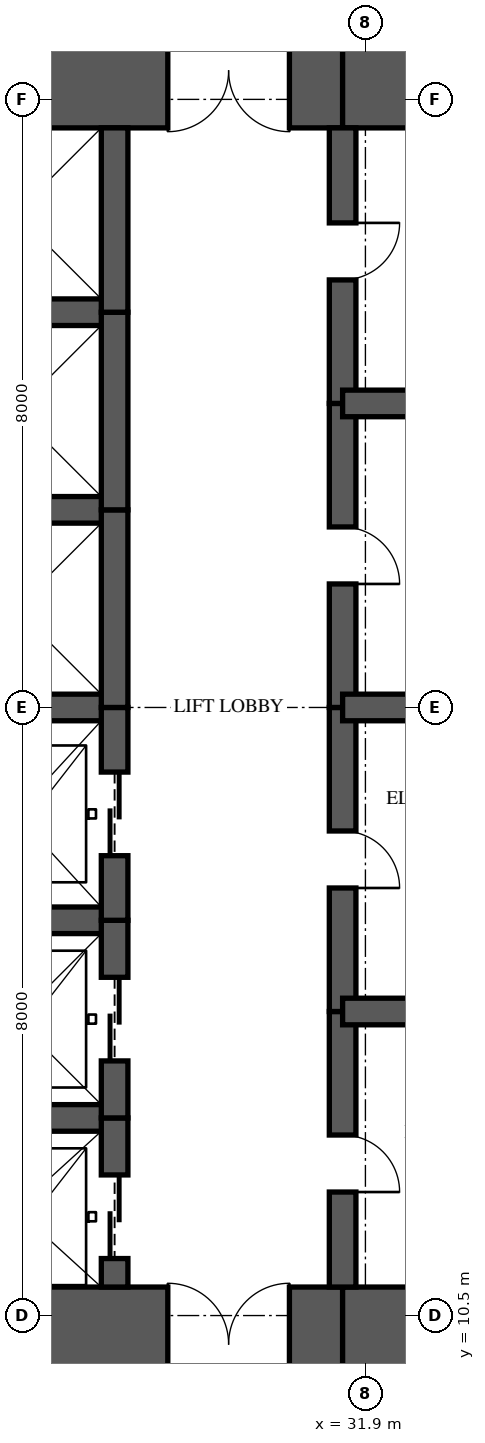
"""IFC4 building model, lengths in metres.
Left out: names, types, materials, properties, quantities, classifications, styles, units other than length and angle.
Written with IfcOpenShell. Run it as: python <this file> out.ifc"""

import sys

from ifc_helpers import new_model, si_unit, direction, frame, frame_2d, origin, place, context, subcontext, project, spatial, rectangle, extrude, element, fill, save


model = new_model("IFC4")
c1 = context("Model", 3, precision=1e-05, world=origin(), true_north=direction((0.0, 1.0)))
c2 = subcontext(c1, "Body", "Model", "MODEL_VIEW")
j1 = project(units=[si_unit("LENGTHUNIT", "METRE"), si_unit("PLANEANGLEUNIT", "RADIAN")], contexts=[c1])
p1 = place(None, origin())
s1 = spatial("IfcSite", under=j1, at=p1, CompositionType="ELEMENT")
p2 = place(p1, origin())
s2 = spatial("IfcBuilding", under=s1, at=p2, CompositionType="ELEMENT")
p3 = place(p2, frame((0.0, 0.0, 135.0)))
s3 = spatial("IfcBuildingStorey", under=s2, at=p3, CompositionType="ELEMENT", Elevation=135.0)
p4 = place(p3, frame((26.0, 10.125, 0.0), z_axis=(0.0, 0.0, 1.0), x_axis=(1.0, 0.0, 0.0)))
e1 = element("IfcWall", 1, at=p4, inside=s3, PredefinedType="SHEAR", context=c2, shape_type="SweptSolid", body=[
    extrude(rectangle(XDim=5.6, YDim=1.5, at=frame_2d((2.8, 0.0))), origin(), (0.0, 0.0, 1.0), 3.35),
])
p5 = place(p4, frame((3.3, 0.0, 0.0)))
e2 = element("IfcOpeningElement", 2, at=p5, cuts=e1, PredefinedType="OPENING", context=c2, shape_type="SweptSolid", body=[
    extrude(rectangle(XDim=1.6, YDim=2.1, at=frame_2d((0.8, 1.05))), frame((0.0, 0.76, 0.0), z_axis=(0.0, -1.0, 0.0), x_axis=(1.0, 0.0, 0.0)), (0.0, 0.0, 1.0), 1.52),
])
for number, where, z_axis, x_axis in (
    (3, (31.6, 10.125, 0.0), (0.0, 0.0, 1.0), (1.0, 0.0, 0.0)),
    (4, (35.9, 26.875, 0.0), (0.0, 0.0, 1.0), (-1.0, 0.0, 0.0)),
):
    element("IfcWall", number, at=place(p3, frame(where, z_axis=z_axis, x_axis=x_axis)), inside=s3, PredefinedType="SHEAR", context=c2, shape_type="SweptSolid", body=[
        extrude(rectangle(XDim=4.3, YDim=1.5, at=frame_2d((2.15, 0.0))), origin(), (0.0, 0.0, 1.0), 3.35),
    ])
p6 = place(p3, frame((31.6, 26.875, 0.0), z_axis=(0.0, 0.0, 1.0), x_axis=(-1.0, 0.0, 0.0)))
e5 = element("IfcWall", 5, at=p6, inside=s3, PredefinedType="SHEAR", context=c2, shape_type="SweptSolid", body=[
    extrude(rectangle(XDim=5.6, YDim=1.5, at=frame_2d((2.8, 0.0))), origin(), (0.0, 0.0, 1.0), 3.35),
])
p7 = place(p6, frame((0.7, 0.0, 0.0)))
e6 = element("IfcOpeningElement", 6, at=p7, cuts=e5, PredefinedType="OPENING", context=c2, shape_type="SweptSolid", body=[
    extrude(rectangle(XDim=1.6, YDim=2.1, at=frame_2d((0.8, 1.05))), frame((0.0, 0.76, 0.0), z_axis=(0.0, -1.0, 0.0), x_axis=(1.0, 0.0, 0.0)), (0.0, 0.0, 1.0), 1.52),
])
p8 = place(p3, frame((28.6, 10.875, 0.0), z_axis=(0.0, 0.0, 1.0), x_axis=(0.0, 1.0, 0.0)))
e7 = element("IfcWall", 7, at=p8, inside=s3, PredefinedType="SHEAR", context=c2, shape_type="SweptSolid", body=[
    extrude(rectangle(XDim=2.225, YDim=0.35, at=frame_2d((1.113, 0.0))), origin(), (0.0, 0.0, 1.0), 3.35),
])
p9 = place(p8, frame((0.375, 0.0, 0.0)))
e8 = element("IfcOpeningElement", 8, at=p9, cuts=e7, PredefinedType="OPENING", context=c2, shape_type="SweptSolid", body=[
    extrude(rectangle(XDim=1.1, YDim=2.1, at=frame_2d((0.55, 1.05))), frame((0.0, 0.185, 0.0), z_axis=(0.0, -1.0, 0.0), x_axis=(1.0, 0.0, 0.0)), (0.0, 0.0, 1.0), 0.37),
])
p10 = place(p3, frame((28.6, 13.1, 0.0), z_axis=(0.0, 0.0, 1.0), x_axis=(0.0, 1.0, 0.0)))
e9 = element("IfcWall", 9, at=p10, inside=s3, PredefinedType="SHEAR", context=c2, shape_type="SweptSolid", body=[
    extrude(rectangle(XDim=2.6, YDim=0.35, at=frame_2d((1.3, 0.0))), origin(), (0.0, 0.0, 1.0), 3.35),
])
p11 = place(p10, frame((0.75, 0.0, 0.0)))
e10 = element("IfcOpeningElement", 10, at=p11, cuts=e9, PredefinedType="OPENING", context=c2, shape_type="SweptSolid", body=[
    extrude(rectangle(XDim=1.1, YDim=2.1, at=frame_2d((0.55, 1.05))), frame((0.0, 0.185, 0.0), z_axis=(0.0, -1.0, 0.0), x_axis=(1.0, 0.0, 0.0)), (0.0, 0.0, 1.0), 0.37),
])
p12 = place(p3, frame((28.6, 15.7, 0.0), z_axis=(0.0, 0.0, 1.0), x_axis=(0.0, 1.0, 0.0)))
e11 = element("IfcWall", 11, at=p12, inside=s3, PredefinedType="SHEAR", context=c2, shape_type="SweptSolid", body=[
    extrude(rectangle(XDim=2.8, YDim=0.35, at=frame_2d((1.4, 0.0))), origin(), (0.0, 0.0, 1.0), 3.35),
])
p13 = place(p12, frame((0.85, 0.0, 0.0)))
e12 = element("IfcOpeningElement", 12, at=p13, cuts=e11, PredefinedType="OPENING", context=c2, shape_type="SweptSolid", body=[
    extrude(rectangle(XDim=1.1, YDim=2.1, at=frame_2d((0.55, 1.05))), frame((0.0, 0.185, 0.0), z_axis=(0.0, -1.0, 0.0), x_axis=(1.0, 0.0, 0.0)), (0.0, 0.0, 1.0), 0.37),
])
p14 = place(p3, frame((28.6, 18.5, 0.0), z_axis=(0.0, 0.0, 1.0), x_axis=(0.0, 1.0, 0.0)))
e13 = element("IfcWall", 13, at=p14, inside=s3, PredefinedType="SHEAR", context=c2, shape_type="SweptSolid", body=[
    extrude(rectangle(XDim=2.6, YDim=0.35, at=frame_2d((1.3, 0.0))), origin(), (0.0, 0.0, 1.0), 3.35),
])
p15 = place(p3, frame((28.6, 21.1, 0.0), z_axis=(0.0, 0.0, 1.0), x_axis=(0.0, 1.0, 0.0)))
e14 = element("IfcWall", 14, at=p15, inside=s3, PredefinedType="SHEAR", context=c2, shape_type="SweptSolid", body=[
    extrude(rectangle(XDim=2.6, YDim=0.35, at=frame_2d((1.3, 0.0))), origin(), (0.0, 0.0, 1.0), 3.35),
])
p16 = place(p3, frame((28.6, 23.7, 0.0), z_axis=(0.0, 0.0, 1.0), x_axis=(0.0, 1.0, 0.0)))
e15 = element("IfcWall", 15, at=p16, inside=s3, PredefinedType="SHEAR", context=c2, shape_type="SweptSolid", body=[
    extrude(rectangle(XDim=2.425, YDim=0.35, at=frame_2d((1.212, 0.0))), origin(), (0.0, 0.0, 1.0), 3.35),
])
p17 = place(p3, frame((31.6, 10.875, 0.0), z_axis=(0.0, 0.0, 1.0), x_axis=(0.0, 1.0, 0.0)))
e16 = element("IfcWall", 16, at=p17, inside=s3, PredefinedType="SHEAR", context=c2, shape_type="SweptSolid", body=[
    extrude(rectangle(XDim=3.625, YDim=0.35, at=frame_2d((1.812, 0.0))), origin(), (0.0, 0.0, 1.0), 3.35),
])
p18 = place(p17, frame((1.25, 0.0, 0.0)))
e17 = element("IfcOpeningElement", 17, at=p18, cuts=e16, PredefinedType="OPENING", context=c2, shape_type="SweptSolid", body=[
    extrude(rectangle(XDim=0.75, YDim=2.1, at=frame_2d((0.375, 1.05))), frame((0.0, 0.185, 0.0), z_axis=(0.0, -1.0, 0.0), x_axis=(1.0, 0.0, 0.0)), (0.0, 0.0, 1.0), 0.37),
])
p19 = place(p3, frame((31.6, 14.5, 0.0), z_axis=(0.0, 0.0, 1.0), x_axis=(0.0, 1.0, 0.0)))
e18 = element("IfcWall", 18, at=p19, inside=s3, PredefinedType="SHEAR", context=c2, shape_type="SweptSolid", body=[
    extrude(rectangle(XDim=4.0, YDim=0.35, at=frame_2d((2.0, 0.0))), origin(), (0.0, 0.0, 1.0), 3.35),
])
p20 = place(p19, frame((1.625, 0.0, 0.0)))
e19 = element("IfcOpeningElement", 19, at=p20, cuts=e18, PredefinedType="OPENING", context=c2, shape_type="SweptSolid", body=[
    extrude(rectangle(XDim=0.75, YDim=2.1, at=frame_2d((0.375, 1.05))), frame((0.0, 0.185, 0.0), z_axis=(0.0, -1.0, 0.0), x_axis=(1.0, 0.0, 0.0)), (0.0, 0.0, 1.0), 0.37),
])
p21 = place(p3, frame((31.6, 18.5, 0.0), z_axis=(0.0, 0.0, 1.0), x_axis=(0.0, 1.0, 0.0)))
e20 = element("IfcWall", 20, at=p21, inside=s3, PredefinedType="SHEAR", context=c2, shape_type="SweptSolid", body=[
    extrude(rectangle(XDim=4.0, YDim=0.35, at=frame_2d((2.0, 0.0))), origin(), (0.0, 0.0, 1.0), 3.35),
])
p22 = place(p21, frame((1.625, 0.0, 0.0)))
e21 = element("IfcOpeningElement", 21, at=p22, cuts=e20, PredefinedType="OPENING", context=c2, shape_type="SweptSolid", body=[
    extrude(rectangle(XDim=0.75, YDim=2.1, at=frame_2d((0.375, 1.05))), frame((0.0, 0.185, 0.0), z_axis=(0.0, -1.0, 0.0), x_axis=(1.0, 0.0, 0.0)), (0.0, 0.0, 1.0), 0.37),
])
p23 = place(p3, frame((31.6, 22.5, 0.0), z_axis=(0.0, 0.0, 1.0), x_axis=(0.0, 1.0, 0.0)))
e22 = element("IfcWall", 22, at=p23, inside=s3, PredefinedType="SHEAR", context=c2, shape_type="SweptSolid", body=[
    extrude(rectangle(XDim=3.625, YDim=0.35, at=frame_2d((1.812, 0.0))), origin(), (0.0, 0.0, 1.0), 3.35),
])
p24 = place(p23, frame((1.625, 0.0, 0.0)))
e23 = element("IfcOpeningElement", 23, at=p24, cuts=e22, PredefinedType="OPENING", context=c2, shape_type="SweptSolid", body=[
    extrude(rectangle(XDim=0.75, YDim=2.1, at=frame_2d((0.375, 1.05))), frame((0.0, 0.185, 0.0), z_axis=(0.0, -1.0, 0.0), x_axis=(1.0, 0.0, 0.0)), (0.0, 0.0, 1.0), 0.37),
])
for number, where, z_axis, x_axis in (
    (24, (26.0, 13.1, 0.0), (0.0, 0.0, 1.0), (1.0, 0.0, 0.0)),
    (25, (26.0, 15.7, 0.0), (0.0, 0.0, 1.0), (1.0, 0.0, 0.0)),
    (26, (26.0, 18.5, 0.0), (0.0, 0.0, 1.0), (1.0, 0.0, 0.0)),
    (27, (26.0, 21.1, 0.0), (0.0, 0.0, 1.0), (1.0, 0.0, 0.0)),
    (28, (26.0, 23.7, 0.0), (0.0, 0.0, 1.0), (1.0, 0.0, 0.0)),
):
    element("IfcWall", number, at=place(p3, frame(where, z_axis=z_axis, x_axis=x_axis)), inside=s3, PredefinedType="SHEAR", context=c2, shape_type="SweptSolid", body=[
        extrude(rectangle(XDim=2.6, YDim=0.35, at=frame_2d((1.3, 0.0))), origin(), (0.0, 0.0, 1.0), 3.35),
    ])
for number, where, z_axis, x_axis in (
    (29, (31.6, 14.5, 0.0), (0.0, 0.0, 1.0), (1.0, 0.0, 0.0)),
    (30, (31.6, 18.5, 0.0), (0.0, 0.0, 1.0), (1.0, 0.0, 0.0)),
    (31, (31.6, 22.5, 0.0), (0.0, 0.0, 1.0), (1.0, 0.0, 0.0)),
):
    element("IfcWall", number, at=place(p3, frame(where, z_axis=z_axis, x_axis=x_axis)), inside=s3, PredefinedType="SHEAR", context=c2, shape_type="SweptSolid", body=[
        extrude(rectangle(XDim=4.3, YDim=0.35, at=frame_2d((2.15, 0.0))), origin(), (0.0, 0.0, 1.0), 3.35),
    ])
p25 = place(p9, origin())
e32 = element("IfcDoor", 32, at=p25, inside=s3, OperationType="SLIDING_TO_LEFT", PredefinedType="DOOR", context=c2, shape_type="SweptSolid", body=[
    extrude(rectangle(XDim=1.1, YDim=2.1, at=frame_2d((0.55, 1.05))), frame((0.0, 0.025, 0.0), z_axis=(0.0, -1.0, 0.0), x_axis=(1.0, 0.0, 0.0)), (0.0, 0.0, 1.0), 0.05),
])
fill(e8, e32)
p26 = place(p11, origin())
e33 = element("IfcDoor", 33, at=p26, inside=s3, OperationType="SLIDING_TO_LEFT", PredefinedType="DOOR", context=c2, shape_type="SweptSolid", body=[
    extrude(rectangle(XDim=1.1, YDim=2.1, at=frame_2d((0.55, 1.05))), frame((0.0, 0.025, 0.0), z_axis=(0.0, -1.0, 0.0), x_axis=(1.0, 0.0, 0.0)), (0.0, 0.0, 1.0), 0.05),
])
fill(e10, e33)
p27 = place(p13, origin())
e34 = element("IfcDoor", 34, at=p27, inside=s3, OperationType="SLIDING_TO_LEFT", PredefinedType="DOOR", context=c2, shape_type="SweptSolid", body=[
    extrude(rectangle(XDim=1.1, YDim=2.1, at=frame_2d((0.55, 1.05))), frame((0.0, 0.025, 0.0), z_axis=(0.0, -1.0, 0.0), x_axis=(1.0, 0.0, 0.0)), (0.0, 0.0, 1.0), 0.05),
])
fill(e12, e34)
p28 = place(p5, origin())
e35 = element("IfcDoor", 35, at=p28, inside=s3, OperationType="DOUBLE_DOOR_SINGLE_SWING", PredefinedType="DOOR", context=c2, shape_type="SweptSolid", body=[
    extrude(rectangle(XDim=1.6, YDim=2.1, at=frame_2d((0.8, 1.05))), frame((0.0, 0.025, 0.0), z_axis=(0.0, -1.0, 0.0), x_axis=(1.0, 0.0, 0.0)), (0.0, 0.0, 1.0), 0.05),
])
fill(e2, e35)
p29 = place(p7, origin())
e36 = element("IfcDoor", 36, at=p29, inside=s3, OperationType="DOUBLE_DOOR_SINGLE_SWING", PredefinedType="DOOR", context=c2, shape_type="SweptSolid", body=[
    extrude(rectangle(XDim=1.6, YDim=2.1, at=frame_2d((0.8, 1.05))), frame((0.0, 0.025, 0.0), z_axis=(0.0, -1.0, 0.0), x_axis=(1.0, 0.0, 0.0)), (0.0, 0.0, 1.0), 0.05),
])
fill(e6, e36)
p30 = place(p18, frame((0.75, 0.0, 0.0), z_axis=(0.0, 0.0, 1.0), x_axis=(-1.0, 0.0, 0.0)))
e37 = element("IfcDoor", 37, at=p30, inside=s3, OperationType="SINGLE_SWING_RIGHT", PredefinedType="DOOR", context=c2, shape_type="SweptSolid", body=[
    extrude(rectangle(XDim=0.75, YDim=2.1, at=frame_2d((0.375, 1.05))), frame((0.0, 0.025, 0.0), z_axis=(0.0, -1.0, 0.0), x_axis=(1.0, 0.0, 0.0)), (0.0, 0.0, 1.0), 0.05),
])
fill(e17, e37)
p31 = place(p20, frame((0.75, 0.0, 0.0), z_axis=(0.0, 0.0, 1.0), x_axis=(-1.0, 0.0, 0.0)))
e38 = element("IfcDoor", 38, at=p31, inside=s3, OperationType="SINGLE_SWING_RIGHT", PredefinedType="DOOR", context=c2, shape_type="SweptSolid", body=[
    extrude(rectangle(XDim=0.75, YDim=2.1, at=frame_2d((0.375, 1.05))), frame((0.0, 0.025, 0.0), z_axis=(0.0, -1.0, 0.0), x_axis=(1.0, 0.0, 0.0)), (0.0, 0.0, 1.0), 0.05),
])
fill(e19, e38)
p32 = place(p22, frame((0.75, 0.0, 0.0), z_axis=(0.0, 0.0, 1.0), x_axis=(-1.0, 0.0, 0.0)))
e39 = element("IfcDoor", 39, at=p32, inside=s3, OperationType="SINGLE_SWING_RIGHT", PredefinedType="DOOR", context=c2, shape_type="SweptSolid", body=[
    extrude(rectangle(XDim=0.75, YDim=2.1, at=frame_2d((0.375, 1.05))), frame((0.0, 0.025, 0.0), z_axis=(0.0, -1.0, 0.0), x_axis=(1.0, 0.0, 0.0)), (0.0, 0.0, 1.0), 0.05),
])
fill(e21, e39)
p33 = place(p24, frame((0.75, 0.0, 0.0), z_axis=(0.0, 0.0, 1.0), x_axis=(-1.0, 0.0, 0.0)))
e40 = element("IfcDoor", 40, at=p33, inside=s3, OperationType="SINGLE_SWING_LEFT", PredefinedType="DOOR", context=c2, shape_type="SweptSolid", body=[
    extrude(rectangle(XDim=0.75, YDim=2.1, at=frame_2d((0.375, 1.05))), frame((0.0, 0.025, 0.0), z_axis=(0.0, -1.0, 0.0), x_axis=(1.0, 0.0, 0.0)), (0.0, 0.0, 1.0), 0.05),
])
fill(e23, e40)
save(model, sys.argv[1])
